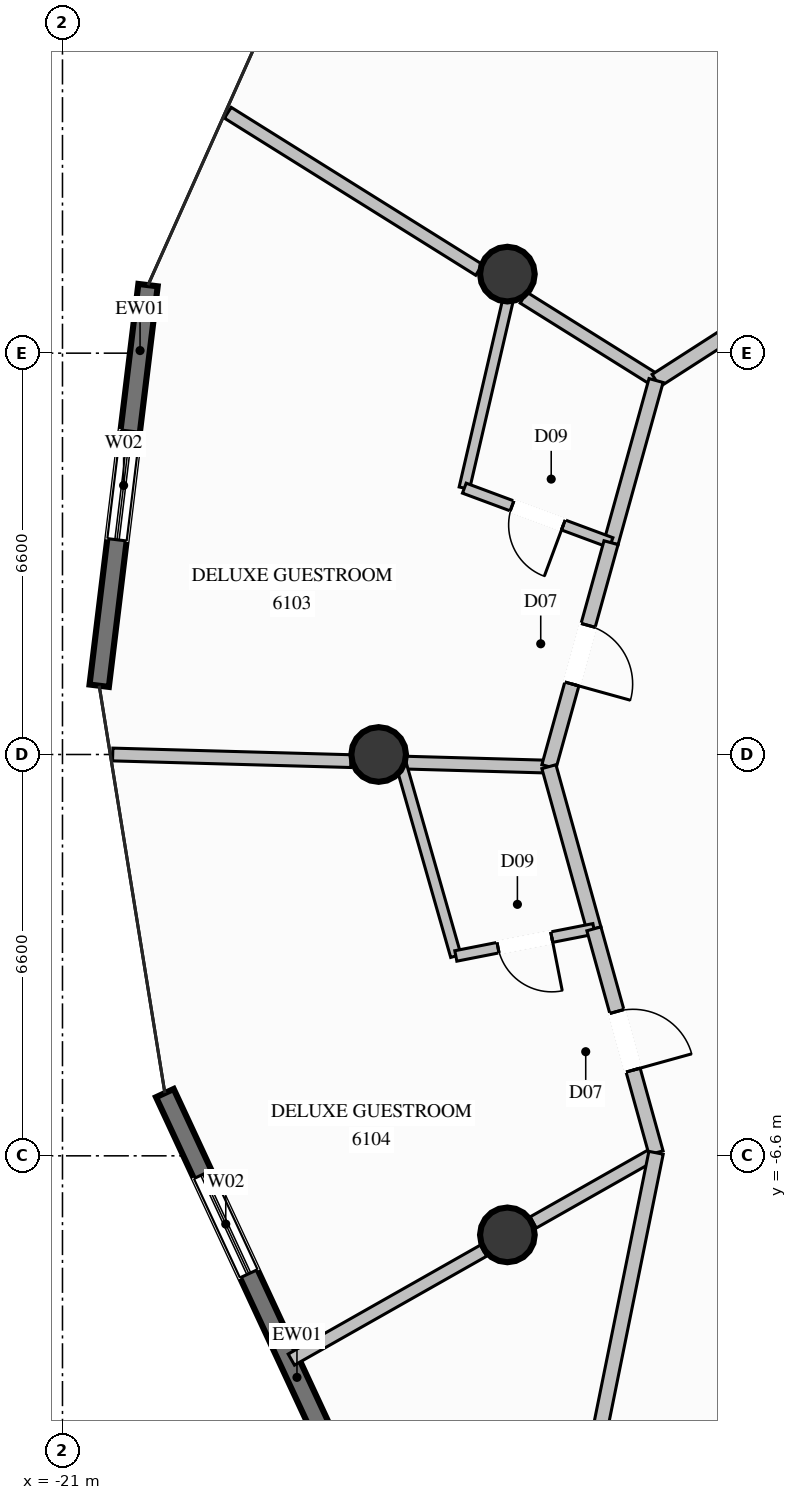
"""IFC4 building model, lengths in metres.
Left out: names, types, materials, properties, quantities, classifications, styles, units other than length and angle.
Written with IfcOpenShell. Run it as: python <this file> out.ifc"""

import sys

from ifc_helpers import new_model, si_unit, direction, frame, frame_2d, origin, origin_2d, place, context, subcontext, project, spatial, rectangle, circle, extrude, element, fill, save


model = new_model("IFC4")
c1 = context("Model", 3, precision=1e-05, world=origin(), true_north=direction((0.0, 1.0)))
c2 = subcontext(c1, "Body", "Model", "MODEL_VIEW")
j1 = project(units=[si_unit("LENGTHUNIT", "METRE"), si_unit("PLANEANGLEUNIT", "RADIAN")], contexts=[c1])
p1 = place(None, origin())
s1 = spatial("IfcSite", under=j1, at=p1, CompositionType="ELEMENT")
p2 = place(p1, origin())
s2 = spatial("IfcBuilding", under=s1, at=p2, CompositionType="ELEMENT")
p3 = place(p2, frame((0.0, 0.0, 227.2)))
s3 = spatial("IfcBuildingStorey", under=s2, at=p3, CompositionType="ELEMENT", Elevation=227.2)
for number, where, z_axis, x_axis in (
    (1, (-13.683, 7.9, 0.0), (0.0, 0.0, 1.0), (1.0, 0.0, 0.0)),
    (2, (-15.8, 0.0, 0.0), (0.0, 0.0, 1.0), (1.0, 0.0, 0.0)),
    (3, (-13.683, -7.9, 0.0), (0.0, 0.0, 1.0), (1.0, 0.0, 0.0)),
):
    element("IfcColumn", number, at=place(p3, frame(where, z_axis=z_axis, x_axis=x_axis)), inside=s3, PredefinedType="COLUMN", context=c2, shape_type="SweptSolid", body=[
        extrude(circle(Radius=0.45, at=origin_2d()), origin(), (0.0, 0.0, 1.0), 3.6),
    ])
p4 = place(p3, frame((-20.396, 1.131, 0.0), z_axis=(0.0, 0.0, 1.0), x_axis=(0.12099160472, 0.992653530486, 0.0)))
e4 = element("IfcWall", 4, at=p4, inside=s3, PredefinedType="SOLIDWALL", context=c2, shape_type="SweptSolid", body=[
    extrude(rectangle(XDim=6.637, YDim=0.32, at=frame_2d((3.318, 0.0))), origin(), (0.0, 0.0, 1.0), 3.36),
])
p5 = place(p4, frame((2.418, 0.0, 0.35)))
e5 = element("IfcOpeningElement", 5, at=p5, cuts=e4, PredefinedType="OPENING", context=c2, shape_type="SweptSolid", body=[
    extrude(rectangle(XDim=1.8, YDim=2.6, at=frame_2d((0.9, 1.3))), frame((0.0, 0.17, 0.0), z_axis=(0.0, -1.0, 0.0), x_axis=(1.0, 0.0, 0.0)), (0.0, 0.0, 1.0), 0.34),
])
p6 = place(p3, frame((-16.457, -11.721, 0.0), z_axis=(0.0, 0.0, 1.0), x_axis=(-0.421379832148, 0.906884246781, 0.0)))
e6 = element("IfcWall", 6, at=p6, inside=s3, PredefinedType="SOLIDWALL", context=c2, shape_type="SweptSolid", body=[
    extrude(rectangle(XDim=6.785, YDim=0.32, at=frame_2d((3.392, 0.0))), origin(), (0.0, 0.0, 1.0), 3.36),
])
p7 = place(p6, frame((3.509, 0.0, 0.35)))
e7 = element("IfcOpeningElement", 7, at=p7, cuts=e6, PredefinedType="OPENING", context=c2, shape_type="SweptSolid", body=[
    extrude(rectangle(XDim=1.8, YDim=2.6, at=frame_2d((0.9, 1.3))), frame((0.0, 0.17, 0.0), z_axis=(0.0, -1.0, 0.0), x_axis=(1.0, 0.0, 0.0)), (0.0, 0.0, 1.0), 0.34),
])
p8 = place(p3, frame((-11.238, 6.15, 0.0), z_axis=(0.0, 0.0, 1.0), x_axis=(-0.847790113394, 0.530331899504, 0.0)))
e8 = element("IfcWall", 8, at=p8, inside=s3, PredefinedType="PARTITIONING", context=c2, shape_type="SweptSolid", body=[
    extrude(rectangle(XDim=2.57, YDim=0.21, at=frame_2d((1.285, 0.0))), origin(), (0.0, 0.0, 1.0), 2.876),
])
p9 = place(p3, frame((-14.148, 7.97, 0.0), z_axis=(0.0, 0.0, 1.0), x_axis=(-0.847922320674, 0.530120493946, 0.0)))
e9 = element("IfcWall", 9, at=p9, inside=s3, PredefinedType="PARTITIONING", context=c2, shape_type="SweptSolid", body=[
    extrude(rectangle(XDim=4.874, YDim=0.21, at=frame_2d((2.437, 0.0))), origin(), (0.0, 0.0, 1.0), 3.36),
])
p10 = place(p3, frame((-13.0, -0.2, 0.0), z_axis=(0.0, 0.0, 1.0), x_axis=(-0.999606857812, 0.028038006608, 0.0)))
e10 = element("IfcWall", 10, at=p10, inside=s3, PredefinedType="PARTITIONING", context=c2, shape_type="SweptSolid", body=[
    extrude(rectangle(XDim=2.351, YDim=0.21, at=frame_2d((1.176, 0.0))), origin(), (0.0, 0.0, 1.0), 3.36),
])
p11 = place(p3, frame((-16.257, -0.109, 0.0), z_axis=(0.0, 0.0, 1.0), x_axis=(-0.999613843988, 0.027787819398, 0.0)))
e11 = element("IfcWall", 11, at=p11, inside=s3, PredefinedType="PARTITIONING", context=c2, shape_type="SweptSolid", body=[
    extrude(rectangle(XDim=3.918, YDim=0.21, at=frame_2d((1.959, 0.0))), origin(), (0.0, 0.0, 1.0), 3.36),
])
p12 = place(p3, frame((-11.238, -6.55, 0.0), z_axis=(0.0, 0.0, 1.0), x_axis=(-0.869880919388, -0.493261782509, 0.0)))
e12 = element("IfcWall", 12, at=p12, inside=s3, PredefinedType="PARTITIONING", context=c2, shape_type="SweptSolid", body=[
    extrude(rectangle(XDim=2.323, YDim=0.21, at=frame_2d((1.162, 0.0))), origin(), (0.0, 0.0, 1.0), 2.876),
])
p13 = place(p3, frame((-14.075, -8.159, 0.0), z_axis=(0.0, 0.0, 1.0), x_axis=(-0.869941481597, -0.493154964081, 0.0)))
e13 = element("IfcWall", 13, at=p13, inside=s3, PredefinedType="PARTITIONING", context=c2, shape_type="SweptSolid", body=[
    extrude(rectangle(XDim=3.634, YDim=0.21, at=frame_2d((1.817, 0.0))), origin(), (0.0, 0.0, 1.0), 3.36),
])
p14 = place(p3, frame((-11.238, 6.15, 0.0), z_axis=(0.0, 0.0, 1.0), x_axis=(0.841118406986, 0.540851019625, 0.0)))
e14 = element("IfcWall", 14, at=p14, inside=s3, PredefinedType="PARTITIONING", context=c2, shape_type="SweptSolid", body=[
    extrude(rectangle(XDim=4.622, YDim=0.24, at=frame_2d((2.311, 0.0))), origin(), (0.0, 0.0, 1.0), 3.36),
])
p15 = place(p14, frame((1.811, 0.0, 0.0)))
e15 = element("IfcOpeningElement", 15, at=p15, cuts=e14, PredefinedType="OPENING", context=c2, shape_type="SweptSolid", body=[
    extrude(rectangle(XDim=1.0, YDim=2.2, at=frame_2d((0.5, 1.1))), frame((0.0, 0.13, 0.0), z_axis=(0.0, -1.0, 0.0), x_axis=(1.0, 0.0, 0.0)), (0.0, 0.0, 1.0), 0.26),
])
p16 = place(p3, frame((-11.238, 6.15, 0.0), z_axis=(0.0, 0.0, 1.0), x_axis=(-0.267361785392, -0.963596220266, 0.0)))
e16 = element("IfcWall", 16, at=p16, inside=s3, PredefinedType="PARTITIONING", context=c2, shape_type="SweptSolid", body=[
    extrude(rectangle(XDim=2.768, YDim=0.24, at=frame_2d((1.384, 0.0))), origin(), (0.0, 0.0, 1.0), 3.36),
])
p17 = place(p3, frame((-13.633, 7.647, 0.0), z_axis=(0.0, 0.0, 1.0), x_axis=(-0.226023632271, -0.974121818694, 0.0)))
e17 = element("IfcWall", 17, at=p17, inside=s3, PredefinedType="PLUMBINGWALL", context=c2, shape_type="SweptSolid", body=[
    extrude(rectangle(XDim=3.354, YDim=0.175, at=frame_2d((1.677, 0.0))), origin(), (0.0, 0.0, 1.0), 2.929),
])
p18 = place(p3, frame((-11.978, 3.483, 0.0), z_axis=(0.0, 0.0, 1.0), x_axis=(-0.937338572647, 0.348419861989, 0.0)))
e18 = element("IfcWall", 18, at=p18, inside=s3, PredefinedType="PLUMBINGWALL", context=c2, shape_type="SweptSolid", body=[
    extrude(rectangle(XDim=2.574, YDim=0.175, at=frame_2d((1.287, 0.0))), origin(), (0.0, 0.0, 1.0), 3.36),
])
p19 = place(p18, frame((0.837, 0.0, 0.0)))
e19 = element("IfcOpeningElement", 19, at=p19, cuts=e18, PredefinedType="OPENING", context=c2, shape_type="SweptSolid", body=[
    extrude(rectangle(XDim=0.9, YDim=2.1, at=frame_2d((0.45, 1.05))), frame((0.0, 0.098, 0.0), z_axis=(0.0, -1.0, 0.0), x_axis=(1.0, 0.0, 0.0)), (0.0, 0.0, 1.0), 0.195),
])
p20 = place(p3, frame((-11.978, 3.483, 0.0), z_axis=(0.0, 0.0, 1.0), x_axis=(-0.267390175797, -0.963588342544, 0.0)))
e20 = element("IfcWall", 20, at=p20, inside=s3, PredefinedType="PARTITIONING", context=c2, shape_type="SweptSolid", body=[
    extrude(rectangle(XDim=3.822, YDim=0.24, at=frame_2d((1.911, 0.0))), origin(), (0.0, 0.0, 1.0), 3.36),
])
p21 = place(p20, frame((1.411, 0.0, 0.0)))
e21 = element("IfcOpeningElement", 21, at=p21, cuts=e20, PredefinedType="OPENING", context=c2, shape_type="SweptSolid", body=[
    extrude(rectangle(XDim=1.0, YDim=2.2, at=frame_2d((0.5, 1.1))), frame((0.0, 0.13, 0.0), z_axis=(0.0, -1.0, 0.0), x_axis=(1.0, 0.0, 0.0)), (0.0, 0.0, 1.0), 0.26),
])
p22 = place(p3, frame((-13.0, -0.2, 0.0), z_axis=(0.0, 0.0, 1.0), x_axis=(0.267361785392, -0.963596220266, 0.0)))
e22 = element("IfcWall", 22, at=p22, inside=s3, PredefinedType="PARTITIONING", context=c2, shape_type="SweptSolid", body=[
    extrude(rectangle(XDim=2.768, YDim=0.24, at=frame_2d((1.384, 0.0))), origin(), (0.0, 0.0, 1.0), 3.36),
])
p23 = place(p3, frame((-15.439, -0.132, 0.0), z_axis=(0.0, 0.0, 1.0), x_axis=(0.27447742631, -0.961593543264, 0.0)))
e23 = element("IfcWall", 23, at=p23, inside=s3, PredefinedType="PLUMBINGWALL", context=c2, shape_type="SweptSolid", body=[
    extrude(rectangle(XDim=3.308, YDim=0.175, at=frame_2d((1.654, 0.0))), origin(), (0.0, 0.0, 1.0), 2.929),
])
p24 = place(p3, frame((-12.26, -2.867, 0.0), z_axis=(0.0, 0.0, 1.0), x_axis=(-0.981252383054, -0.192727166614, 0.0)))
e24 = element("IfcWall", 24, at=p24, inside=s3, PredefinedType="PLUMBINGWALL", context=c2, shape_type="SweptSolid", body=[
    extrude(rectangle(XDim=2.314, YDim=0.175, at=frame_2d((1.157, 0.0))), origin(), (0.0, 0.0, 1.0), 3.36),
])
p25 = place(p24, frame((0.707, 0.0, 0.0)))
e25 = element("IfcOpeningElement", 25, at=p25, cuts=e24, PredefinedType="OPENING", context=c2, shape_type="SweptSolid", body=[
    extrude(rectangle(XDim=0.9, YDim=2.1, at=frame_2d((0.45, 1.05))), frame((0.0, 0.098, 0.0), z_axis=(0.0, -1.0, 0.0), x_axis=(1.0, 0.0, 0.0)), (0.0, 0.0, 1.0), 0.195),
])
p26 = place(p3, frame((-12.26, -2.867, 0.0), z_axis=(0.0, 0.0, 1.0), x_axis=(0.267373718537, -0.963592909187, 0.0)))
e26 = element("IfcWall", 26, at=p26, inside=s3, PredefinedType="PARTITIONING", context=c2, shape_type="SweptSolid", body=[
    extrude(rectangle(XDim=3.822, YDim=0.24, at=frame_2d((1.911, 0.0))), origin(), (0.0, 0.0, 1.0), 3.36),
])
p27 = place(p26, frame((1.411, 0.0, 0.0)))
e27 = element("IfcOpeningElement", 27, at=p27, cuts=e26, PredefinedType="OPENING", context=c2, shape_type="SweptSolid", body=[
    extrude(rectangle(XDim=1.0, YDim=2.2, at=frame_2d((0.5, 1.1))), frame((0.0, 0.13, 0.0), z_axis=(0.0, -1.0, 0.0), x_axis=(1.0, 0.0, 0.0)), (0.0, 0.0, 1.0), 0.26),
])
p28 = place(p3, frame((-11.238, -6.55, 0.0), z_axis=(0.0, 0.0, 1.0), x_axis=(-0.198271934001, -0.980147050288, 0.0)))
e28 = element("IfcWall", 28, at=p28, inside=s3, PredefinedType="PARTITIONING", context=c2, shape_type="SweptSolid", body=[
    extrude(rectangle(XDim=5.356, YDim=0.24, at=frame_2d((2.678, 0.0))), origin(), (0.0, 0.0, 1.0), 3.36),
])
p29 = place(p5, origin())
e29 = element("IfcWindow", 29, at=p29, inside=s3, PartitioningType="SINGLE_PANEL", PredefinedType="WINDOW", context=c2, shape_type="SweptSolid", body=[
    extrude(rectangle(XDim=1.8, YDim=2.6, at=frame_2d((0.9, 1.3))), frame((0.0, 0.03, 0.0), z_axis=(0.0, -1.0, 0.0), x_axis=(1.0, 0.0, 0.0)), (0.0, 0.0, 1.0), 0.06),
])
fill(e5, e29)
p30 = place(p7, origin())
e30 = element("IfcWindow", 30, at=p30, inside=s3, PartitioningType="SINGLE_PANEL", PredefinedType="WINDOW", context=c2, shape_type="SweptSolid", body=[
    extrude(rectangle(XDim=1.8, YDim=2.6, at=frame_2d((0.9, 1.3))), frame((0.0, 0.03, 0.0), z_axis=(0.0, -1.0, 0.0), x_axis=(1.0, 0.0, 0.0)), (0.0, 0.0, 1.0), 0.06),
])
fill(e7, e30)
p31 = place(p19, origin())
e31 = element("IfcDoor", 31, at=p31, inside=s3, OperationType="SINGLE_SWING_LEFT", PredefinedType="DOOR", context=c2, shape_type="SweptSolid", body=[
    extrude(rectangle(XDim=0.9, YDim=2.1, at=frame_2d((0.45, 1.05))), frame((0.0, 0.025, 0.0), z_axis=(0.0, -1.0, 0.0), x_axis=(1.0, 0.0, 0.0)), (0.0, 0.0, 1.0), 0.05),
])
fill(e19, e31)
p32 = place(p21, origin())
e32 = element("IfcDoor", 32, at=p32, inside=s3, OperationType="SINGLE_SWING_RIGHT", PredefinedType="DOOR", context=c2, shape_type="SweptSolid", body=[
    extrude(rectangle(XDim=1.0, YDim=2.2, at=frame_2d((0.5, 1.1))), frame((0.0, 0.025, 0.0), z_axis=(0.0, -1.0, 0.0), x_axis=(1.0, 0.0, 0.0)), (0.0, 0.0, 1.0), 0.05),
])
fill(e21, e32)
p33 = place(p25, origin())
e33 = element("IfcDoor", 33, at=p33, inside=s3, OperationType="SINGLE_SWING_LEFT", PredefinedType="DOOR", context=c2, shape_type="SweptSolid", body=[
    extrude(rectangle(XDim=0.9, YDim=2.1, at=frame_2d((0.45, 1.05))), frame((0.0, 0.025, 0.0), z_axis=(0.0, -1.0, 0.0), x_axis=(1.0, 0.0, 0.0)), (0.0, 0.0, 1.0), 0.05),
])
fill(e25, e33)
p34 = place(p27, origin())
e34 = element("IfcDoor", 34, at=p34, inside=s3, OperationType="SINGLE_SWING_RIGHT", PredefinedType="DOOR", context=c2, shape_type="SweptSolid", body=[
    extrude(rectangle(XDim=1.0, YDim=2.2, at=frame_2d((0.5, 1.1))), frame((0.0, 0.025, 0.0), z_axis=(0.0, -1.0, 0.0), x_axis=(1.0, 0.0, 0.0)), (0.0, 0.0, 1.0), 0.05),
])
fill(e27, e34)
save(model, sys.argv[1])
